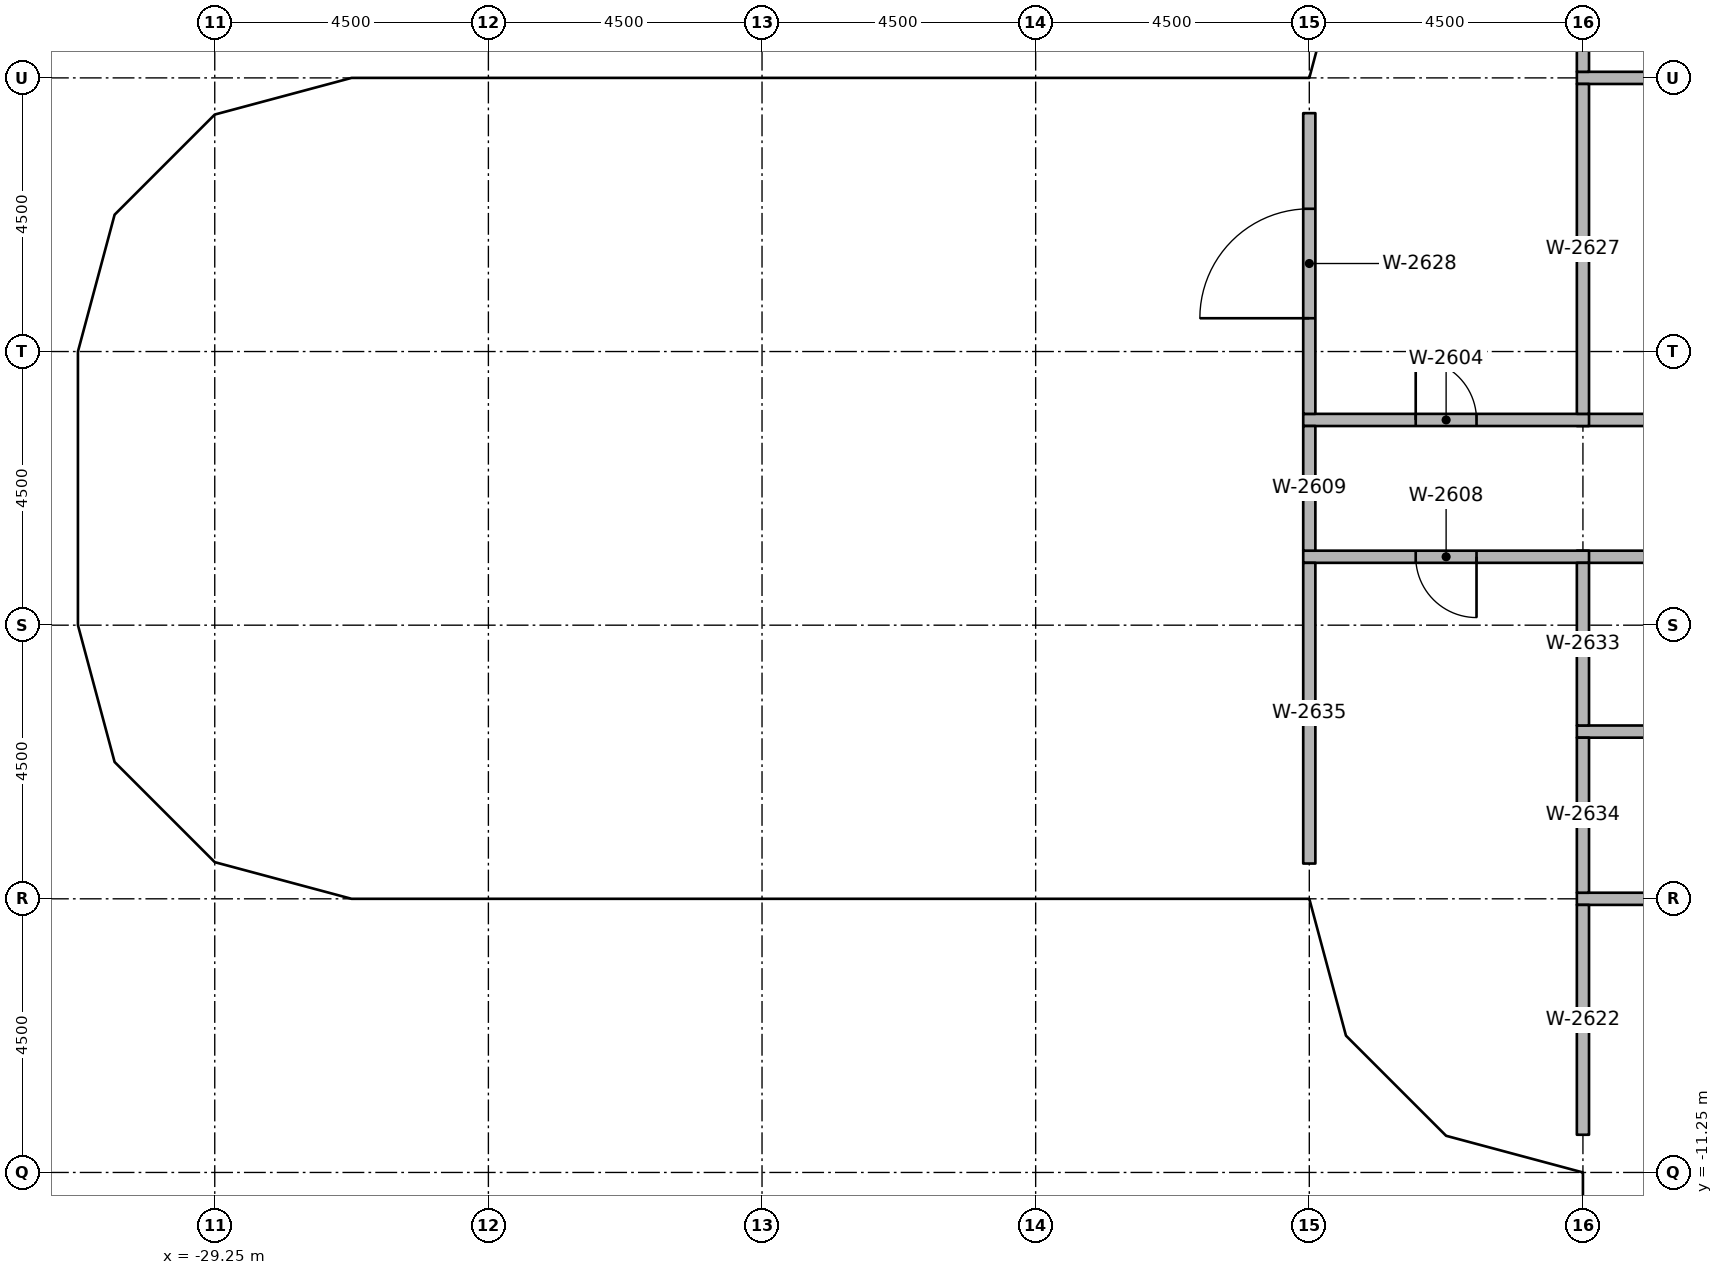
"""IFC4 building model, lengths in metres.
Left out: names, types, materials, properties, quantities, classifications, styles, units other than length and angle.
Written with IfcOpenShell. Run it as: python <this file> out.ifc"""

import sys

from ifc_helpers import new_model, si_unit, direction, frame, frame_2d, origin, origin_2d, place, context, subcontext, project, spatial, rectangle, extrude, element, fill, save


model = new_model("IFC4")
c1 = context("Model", 3, precision=1e-05, world=origin(), true_north=direction((0.0, 1.0)))
c2 = subcontext(c1, "Body", "Model", "MODEL_VIEW")
j1 = project(units=[si_unit("LENGTHUNIT", "METRE"), si_unit("PLANEANGLEUNIT", "RADIAN")], contexts=[c1])
p1 = place(None, origin())
s1 = spatial("IfcSite", under=j1, at=p1, CompositionType="ELEMENT")
p2 = place(p1, origin())
s2 = spatial("IfcBuilding", under=s1, at=p2, CompositionType="ELEMENT")
p3 = place(p2, frame((0.0, 0.0, 249.8)))
s3 = spatial("IfcBuildingStorey", under=s2, at=p3, CompositionType="ELEMENT", Elevation=249.8)
for number, where, z_axis, x_axis in (
    (1, (-28.908, -5.475, 0.0), (0.0, 0.0, 1.0), (1.0, 0.0, 0.0)),
    (2, (-28.908, 5.475, 0.0), (0.0, 0.0, 1.0), (1.0, 0.0, 0.0)),
    (3, (-24.75, -6.25, 0.0), (0.0, 0.0, 1.0), (1.0, 0.0, 0.0)),
    (4, (-24.75, 6.25, 0.0), (0.0, 0.0, 1.0), (1.0, 0.0, 0.0)),
    (5, (-20.25, -6.11, 0.0), (0.0, 0.0, 1.0), (1.0, 0.0, 0.0)),
    (6, (-20.25, 6.11, 0.0), (0.0, 0.0, 1.0), (1.0, 0.0, 0.0)),
    (7, (-15.75, -6.25, 0.0), (0.0, 0.0, 1.0), (1.0, 0.0, 0.0)),
    (8, (-15.75, 6.25, 0.0), (0.0, 0.0, 1.0), (1.0, 0.0, 0.0)),
    (9, (-10.75, -6.25, 0.0), (0.0, 0.0, 1.0), (1.0, 0.0, 0.0)),
    (10, (-10.75, 6.25, 0.0), (0.0, 0.0, 1.0), (1.0, 0.0, 0.0)),
    (11, (-6.25, -10.75, 0.0), (0.0, 0.0, 1.0), (1.0, 0.0, 0.0)),
    (12, (-6.25, -6.25, 0.0), (0.0, 0.0, 1.0), (1.0, 0.0, 0.0)),
    (13, (-6.25, 6.25, 0.0), (0.0, 0.0, 1.0), (1.0, 0.0, 0.0)),
):
    element("IfcColumn", number, at=place(p3, frame(where, z_axis=z_axis, x_axis=x_axis)), inside=s3, PredefinedType="COLUMN", context=c2, shape_type="SweptSolid", body=[
        extrude(rectangle(XDim=0.6, YDim=0.6, at=origin_2d()), origin(), (0.0, 0.0, 1.0), 3.65),
    ])
p4 = place(p3, frame((-6.85, 1.125, 0.0), z_axis=(0.0, 0.0, 1.0), x_axis=(1.0, 0.0, 0.0)))
e14 = element("IfcWall", 14, at=p4, inside=s3, PredefinedType="PARTITIONING", context=c2, shape_type="SweptSolid", body=[
    extrude(rectangle(XDim=5.825, YDim=0.2, at=frame_2d((2.913, 0.0))), origin(), (0.0, 0.0, 1.0), 2.75),
])
p5 = place(p4, frame((2.413, 0.0, 0.0)))
e15 = element("IfcOpeningElement", 15, at=p5, cuts=e14, PredefinedType="OPENING", context=c2, shape_type="SweptSolid", body=[
    extrude(rectangle(XDim=1.0, YDim=2.1, at=frame_2d((0.5, 1.05))), frame((0.0, 0.11, 0.0), z_axis=(0.0, -1.0, 0.0), x_axis=(1.0, 0.0, 0.0)), (0.0, 0.0, 1.0), 0.22),
])
p6 = place(p3, frame((-11.35, 1.125, 0.0), z_axis=(0.0, 0.0, 1.0), x_axis=(1.0, 0.0, 0.0)))
e16 = element("IfcWall", 16, at=p6, inside=s3, PredefinedType="PARTITIONING", context=c2, shape_type="SweptSolid", body=[
    extrude(rectangle(XDim=4.7, YDim=0.2, at=frame_2d((2.35, 0.0))), origin(), (0.0, 0.0, 1.0), 2.75),
])
p7 = place(p6, frame((1.85, 0.0, 0.0)))
e17 = element("IfcOpeningElement", 17, at=p7, cuts=e16, PredefinedType="OPENING", context=c2, shape_type="SweptSolid", body=[
    extrude(rectangle(XDim=1.0, YDim=2.1, at=frame_2d((0.5, 1.05))), frame((0.0, 0.11, 0.0), z_axis=(0.0, -1.0, 0.0), x_axis=(1.0, 0.0, 0.0)), (0.0, 0.0, 1.0), 0.22),
])
p8 = place(p3, frame((-1.025, -1.125, 0.0), z_axis=(0.0, 0.0, 1.0), x_axis=(-1.0, 0.0, 0.0)))
e18 = element("IfcWall", 18, at=p8, inside=s3, PredefinedType="PARTITIONING", context=c2, shape_type="SweptSolid", body=[
    extrude(rectangle(XDim=5.825, YDim=0.2, at=frame_2d((2.913, 0.0))), origin(), (0.0, 0.0, 1.0), 2.75),
])
p9 = place(p8, frame((2.462, 0.0, 0.0)))
e19 = element("IfcOpeningElement", 19, at=p9, cuts=e18, PredefinedType="OPENING", context=c2, shape_type="SweptSolid", body=[
    extrude(rectangle(XDim=0.9, YDim=2.1, at=frame_2d((0.45, 1.05))), frame((0.0, 0.11, 0.0), z_axis=(0.0, -1.0, 0.0), x_axis=(1.0, 0.0, 0.0)), (0.0, 0.0, 1.0), 0.22),
])
p10 = place(p3, frame((-6.65, -1.125, 0.0), z_axis=(0.0, 0.0, 1.0), x_axis=(-1.0, 0.0, 0.0)))
e20 = element("IfcWall", 20, at=p10, inside=s3, PredefinedType="PARTITIONING", context=c2, shape_type="SweptSolid", body=[
    extrude(rectangle(XDim=4.7, YDim=0.2, at=frame_2d((2.35, 0.0))), origin(), (0.0, 0.0, 1.0), 2.75),
])
p11 = place(p10, frame((1.85, 0.0, 0.0)))
e21 = element("IfcOpeningElement", 21, at=p11, cuts=e20, PredefinedType="OPENING", context=c2, shape_type="SweptSolid", body=[
    extrude(rectangle(XDim=1.0, YDim=2.1, at=frame_2d((0.5, 1.05))), frame((0.0, 0.11, 0.0), z_axis=(0.0, -1.0, 0.0), x_axis=(1.0, 0.0, 0.0)), (0.0, 0.0, 1.0), 0.22),
])
p12 = place(p3, frame((-11.25, -1.025, 0.0), z_axis=(0.0, 0.0, 1.0), x_axis=(0.0, 1.0, 0.0)))
e22 = element("IfcWall", 22, at=p12, inside=s3, PredefinedType="PARTITIONING", context=c2, shape_type="SweptSolid", body=[
    extrude(rectangle(XDim=2.05, YDim=0.2, at=frame_2d((1.025, 0.0))), origin(), (0.0, 0.0, 1.0), 2.75),
])
p13 = place(p3, frame((-6.85, 6.75, 0.0), z_axis=(0.0, 0.0, 1.0), x_axis=(1.0, 0.0, 0.0)))
e23 = element("IfcWall", 23, at=p13, inside=s3, PredefinedType="PARTITIONING", context=c2, shape_type="SweptSolid", body=[
    extrude(rectangle(XDim=5.825, YDim=0.2, at=frame_2d((2.913, 0.0))), origin(), (0.0, 0.0, 1.0), 2.75),
])
p14 = place(p3, frame((-6.75, 6.85, 0.0), z_axis=(0.0, 0.0, 1.0), x_axis=(0.0, 1.0, 0.0)))
e24 = element("IfcWall", 24, at=p14, inside=s3, PredefinedType="PARTITIONING", context=c2, shape_type="SweptSolid", body=[
    extrude(rectangle(XDim=3.78, YDim=0.2, at=frame_2d((1.89, 0.0))), origin(), (0.0, 0.0, 1.0), 2.75),
])
p15 = place(p3, frame((-6.85, -6.75, 0.0), z_axis=(0.0, 0.0, 1.0), x_axis=(1.0, 0.0, 0.0)))
e25 = element("IfcWall", 25, at=p15, inside=s3, PredefinedType="PARTITIONING", context=c2, shape_type="SweptSolid", body=[
    extrude(rectangle(XDim=5.825, YDim=0.2, at=frame_2d((2.913, 0.0))), origin(), (0.0, 0.0, 1.0), 2.75),
])
p16 = place(p3, frame((-6.75, -10.63, 0.0), z_axis=(0.0, 0.0, 1.0), x_axis=(0.0, 1.0, 0.0)))
e26 = element("IfcWall", 26, at=p16, inside=s3, PredefinedType="PARTITIONING", context=c2, shape_type="SweptSolid", body=[
    extrude(rectangle(XDim=3.78, YDim=0.2, at=frame_2d((1.89, 0.0))), origin(), (0.0, 0.0, 1.0), 2.75),
])
p17 = place(p3, frame((-6.75, 1.225, 0.0), z_axis=(0.0, 0.0, 1.0), x_axis=(0.0, 1.0, 0.0)))
e27 = element("IfcWall", 27, at=p17, inside=s3, PredefinedType="PARTITIONING", context=c2, shape_type="SweptSolid", body=[
    extrude(rectangle(XDim=5.425, YDim=0.2, at=frame_2d((2.712, 0.0))), origin(), (0.0, 0.0, 1.0), 2.75),
])
p18 = place(p3, frame((-11.25, 1.225, 0.0), z_axis=(0.0, 0.0, 1.0), x_axis=(0.0, 1.0, 0.0)))
e28 = element("IfcWall", 28, at=p18, inside=s3, PredefinedType="PARTITIONING", context=c2, shape_type="SweptSolid", body=[
    extrude(rectangle(XDim=4.945, YDim=0.2, at=frame_2d((2.472, 0.0))), origin(), (0.0, 0.0, 1.0), 2.75),
])
p19 = place(p18, frame((1.573, 0.0, 0.0)))
e29 = element("IfcOpeningElement", 29, at=p19, cuts=e28, PredefinedType="OPENING", context=c2, shape_type="SweptSolid", body=[
    extrude(rectangle(XDim=1.8, YDim=2.1, at=frame_2d((0.9, 1.05))), frame((0.0, 0.11, 0.0), z_axis=(0.0, -1.0, 0.0), x_axis=(1.0, 0.0, 0.0)), (0.0, 0.0, 1.0), 0.22),
])
p20 = place(p3, frame((-6.85, -4.0, 0.0), z_axis=(0.0, 0.0, 1.0), x_axis=(1.0, 0.0, 0.0)))
e30 = element("IfcWall", 30, at=p20, inside=s3, PredefinedType="PARTITIONING", context=c2, shape_type="SweptSolid", body=[
    extrude(rectangle(XDim=5.825, YDim=0.2, at=frame_2d((2.913, 0.0))), origin(), (0.0, 0.0, 1.0), 2.75),
])
p21 = place(p3, frame((-6.75, -3.9, 0.0), z_axis=(0.0, 0.0, 1.0), x_axis=(0.0, 1.0, 0.0)))
e31 = element("IfcWall", 31, at=p21, inside=s3, PredefinedType="PARTITIONING", context=c2, shape_type="SweptSolid", body=[
    extrude(rectangle(XDim=2.675, YDim=0.2, at=frame_2d((1.337, 0.0))), origin(), (0.0, 0.0, 1.0), 2.75),
])
p22 = place(p3, frame((-6.75, -6.65, 0.0), z_axis=(0.0, 0.0, 1.0), x_axis=(0.0, 1.0, 0.0)))
e32 = element("IfcWall", 32, at=p22, inside=s3, PredefinedType="PARTITIONING", context=c2, shape_type="SweptSolid", body=[
    extrude(rectangle(XDim=2.55, YDim=0.2, at=frame_2d((1.275, 0.0))), origin(), (0.0, 0.0, 1.0), 2.75),
])
p23 = place(p3, frame((-11.25, -6.17, 0.0), z_axis=(0.0, 0.0, 1.0), x_axis=(0.0, 1.0, 0.0)))
e33 = element("IfcWall", 33, at=p23, inside=s3, PredefinedType="PARTITIONING", context=c2, shape_type="SweptSolid", body=[
    extrude(rectangle(XDim=4.945, YDim=0.2, at=frame_2d((2.472, 0.0))), origin(), (0.0, 0.0, 1.0), 2.75),
])
p24 = place(p7, origin())
e34 = element("IfcDoor", 34, at=p24, inside=s3, OperationType="SINGLE_SWING_RIGHT", PredefinedType="DOOR", context=c2, shape_type="SweptSolid", body=[
    extrude(rectangle(XDim=1.0, YDim=2.1, at=frame_2d((0.5, 1.05))), frame((0.0, 0.025, 0.0), z_axis=(0.0, -1.0, 0.0), x_axis=(1.0, 0.0, 0.0)), (0.0, 0.0, 1.0), 0.05),
])
fill(e17, e34)
p25 = place(p11, origin())
e35 = element("IfcDoor", 35, at=p25, inside=s3, OperationType="SINGLE_SWING_RIGHT", PredefinedType="DOOR", context=c2, shape_type="SweptSolid", body=[
    extrude(rectangle(XDim=1.0, YDim=2.1, at=frame_2d((0.5, 1.05))), frame((0.0, 0.025, 0.0), z_axis=(0.0, -1.0, 0.0), x_axis=(1.0, 0.0, 0.0)), (0.0, 0.0, 1.0), 0.05),
])
fill(e21, e35)
p26 = place(p19, origin())
e36 = element("IfcDoor", 36, at=p26, inside=s3, OperationType="DOUBLE_DOOR_SINGLE_SWING", PredefinedType="DOOR", context=c2, shape_type="SweptSolid", body=[
    extrude(rectangle(XDim=1.8, YDim=2.1, at=frame_2d((0.9, 1.05))), frame((0.0, 0.025, 0.0), z_axis=(0.0, -1.0, 0.0), x_axis=(1.0, 0.0, 0.0)), (0.0, 0.0, 1.0), 0.05),
])
fill(e29, e36)
save(model, sys.argv[1])
